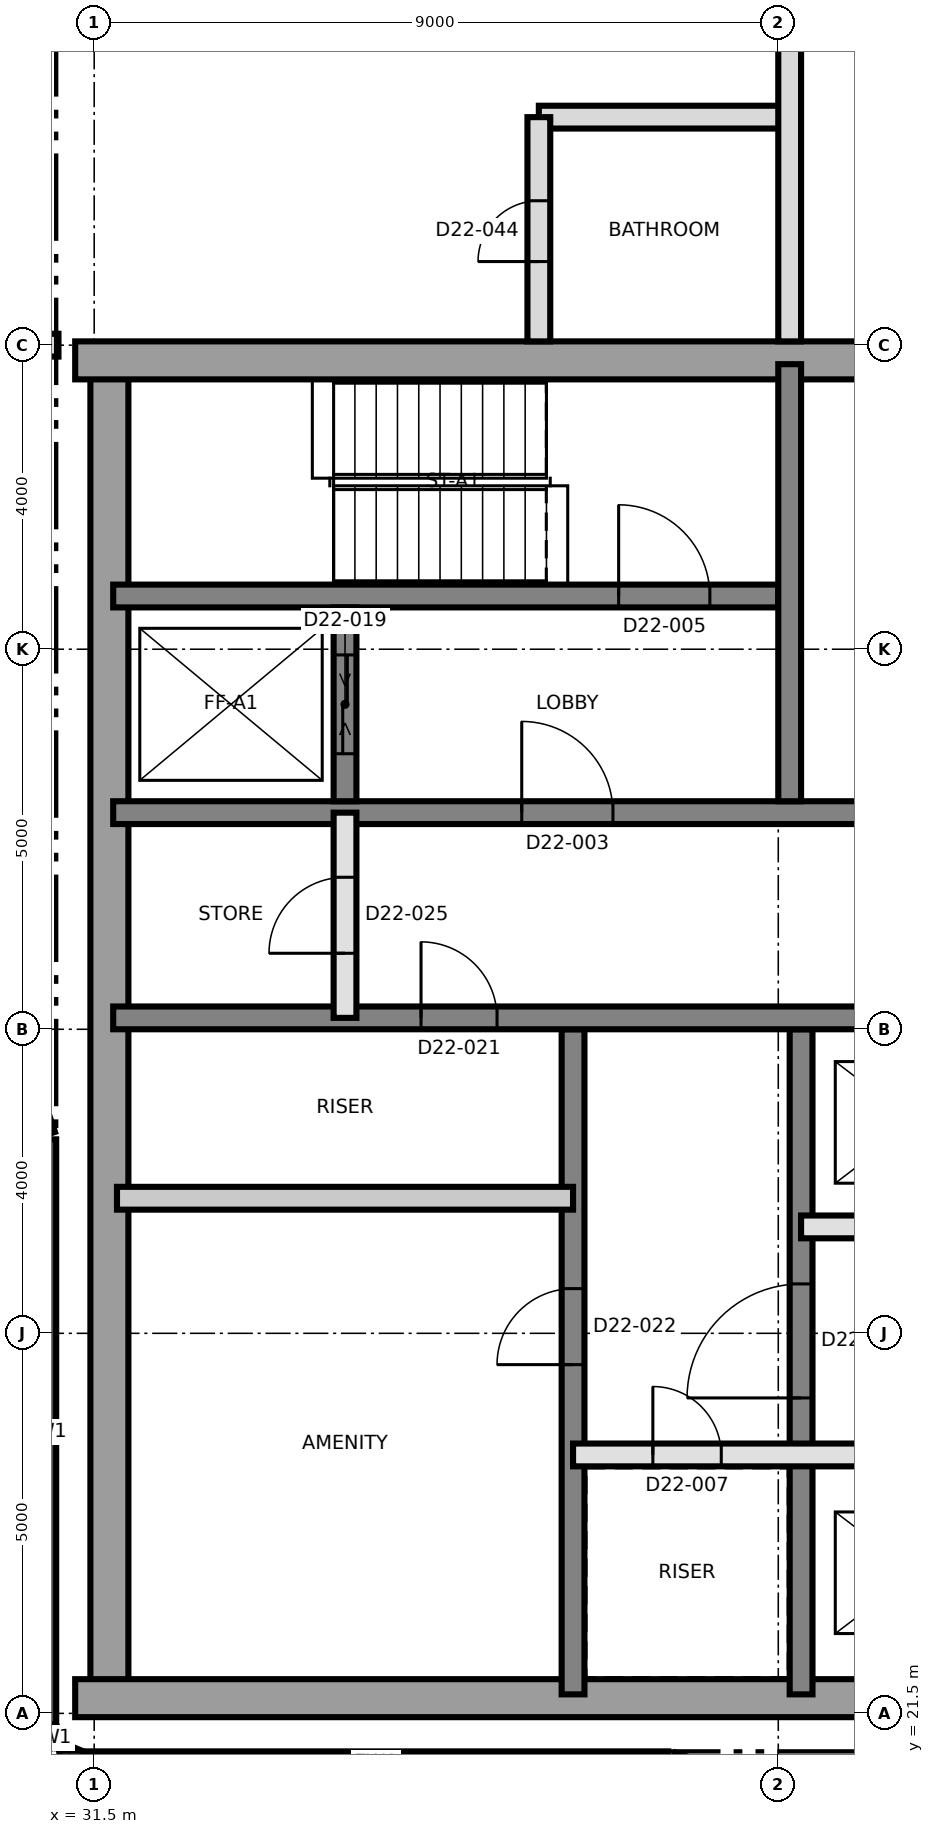
"""IFC4 building model, lengths in metres.
Left out: names, types, materials, properties, quantities, classifications, styles, units other than length and angle.
Written with IfcOpenShell. Run it as: python <this file> out.ifc"""

import sys

from ifc_helpers import new_model, si_unit, direction, frame, frame_2d, origin, place, context, subcontext, project, spatial, rectangle, extrude, element, fill, save


model = new_model("IFC4")
c1 = context("Model", 3, precision=1e-05, world=origin(), true_north=direction((0.0, 1.0)))
c2 = subcontext(c1, "Body", "Model", "MODEL_VIEW")
j1 = project(units=[si_unit("LENGTHUNIT", "METRE"), si_unit("PLANEANGLEUNIT", "RADIAN")], contexts=[c1])
p1 = place(None, origin())
s1 = spatial("IfcSite", under=j1, at=p1, CompositionType="ELEMENT")
p2 = place(p1, origin())
s2 = spatial("IfcBuilding", under=s1, at=p2, CompositionType="ELEMENT")
p3 = place(p2, frame((0.0, 0.0, 199.5)))
s3 = spatial("IfcBuildingStorey", under=s2, at=p3, CompositionType="ELEMENT", Elevation=199.5)
p4 = place(p3, frame((31.7, 21.75, 0.0), z_axis=(0.0, 0.0, 1.0), x_axis=(0.0, 1.0, 0.0)))
e1 = element("IfcWall", 1, at=p4, inside=s3, PredefinedType="SHEAR", context=c2, shape_type="SweptSolid", body=[
    extrude(rectangle(XDim=17.5, YDim=0.5, at=frame_2d((8.75, 0.0))), origin(), (0.0, 0.0, 1.0), 3.7),
])
p5 = place(p3, frame((31.25, 21.7, 0.0), z_axis=(0.0, 0.0, 1.0), x_axis=(1.0, 0.0, 0.0)))
e2 = element("IfcWall", 2, at=p5, inside=s3, PredefinedType="SHEAR", context=c2, shape_type="SweptSolid", body=[
    extrude(rectangle(XDim=27.0, YDim=0.5, at=frame_2d((13.5, 0.0))), origin(), (0.0, 0.0, 1.0), 3.7),
])
p6 = place(p3, frame((31.25, 39.3, 0.0), z_axis=(0.0, 0.0, 1.0), x_axis=(1.0, 0.0, 0.0)))
e3 = element("IfcWall", 3, at=p6, inside=s3, PredefinedType="SHEAR", context=c2, shape_type="SweptSolid", body=[
    extrude(rectangle(XDim=27.0, YDim=0.5, at=frame_2d((13.5, 0.0))), origin(), (0.0, 0.0, 1.0), 3.7),
])
p7 = place(p6, frame((10.45, 0.0, 0.0)))
e4 = element("IfcOpeningElement", 4, at=p7, cuts=e3, PredefinedType="OPENING", context=c2, shape_type="SweptSolid", body=[
    extrude(rectangle(XDim=1.2, YDim=2.1, at=frame_2d((0.6, 1.05))), frame((0.0, 0.26, 0.0), z_axis=(0.0, -1.0, 0.0), x_axis=(1.0, 0.0, 0.0)), (0.0, 0.0, 1.0), 0.52),
])
p8 = place(p3, frame((37.8, 21.75, 0.0), z_axis=(0.0, 0.0, 1.0), x_axis=(0.0, 1.0, 0.0)))
e5 = element("IfcWall", 5, at=p8, inside=s3, PredefinedType="SHEAR", context=c2, shape_type="SweptSolid", body=[
    extrude(rectangle(XDim=8.75, YDim=0.3, at=frame_2d((4.375, 0.0))), origin(), (0.0, 0.0, 1.0), 3.7),
])
p9 = place(p8, frame((4.338, 0.0, 0.0)))
e6 = element("IfcOpeningElement", 6, at=p9, cuts=e5, PredefinedType="OPENING", context=c2, shape_type="SweptSolid", body=[
    extrude(rectangle(XDim=1.0, YDim=2.1, at=frame_2d((0.5, 1.05))), frame((0.0, 0.16, 0.0), z_axis=(0.0, -1.0, 0.0), x_axis=(1.0, 0.0, 0.0)), (0.0, 0.0, 1.0), 0.32),
])
p10 = place(p3, frame((40.8, 21.75, 0.0), z_axis=(0.0, 0.0, 1.0), x_axis=(0.0, 1.0, 0.0)))
e7 = element("IfcWall", 7, at=p10, inside=s3, PredefinedType="SHEAR", context=c2, shape_type="SweptSolid", body=[
    extrude(rectangle(XDim=8.75, YDim=0.3, at=frame_2d((4.375, 0.0))), origin(), (0.0, 0.0, 1.0), 3.7),
])
p11 = place(p10, frame((3.9, 0.0, 0.0)))
e8 = element("IfcOpeningElement", 8, at=p11, cuts=e7, PredefinedType="OPENING", context=c2, shape_type="SweptSolid", body=[
    extrude(rectangle(XDim=1.5, YDim=2.1, at=frame_2d((0.75, 1.05))), frame((0.0, 0.16, 0.0), z_axis=(0.0, -1.0, 0.0), x_axis=(1.0, 0.0, 0.0)), (0.0, 0.0, 1.0), 0.32),
])
p12 = place(p3, frame((31.75, 30.65, 0.0), z_axis=(0.0, 0.0, 1.0), x_axis=(1.0, 0.0, 0.0)))
e9 = element("IfcWall", 9, at=p12, inside=s3, PredefinedType="SHEAR", context=c2, shape_type="SweptSolid", body=[
    extrude(rectangle(XDim=26.5, YDim=0.3, at=frame_2d((13.25, 0.0))), origin(), (0.0, 0.0, 1.0), 3.7),
])
p13 = place(p12, frame((24.75, 0.0, 0.0)))
e10 = element("IfcOpeningElement", 10, at=p13, cuts=e9, PredefinedType="OPENING", context=c2, shape_type="SweptSolid", body=[
    extrude(rectangle(XDim=1.0, YDim=2.1, at=frame_2d((0.5, 1.05))), frame((0.0, 0.16, 0.0), z_axis=(0.0, -1.0, 0.0), x_axis=(1.0, 0.0, 0.0)), (0.0, 0.0, 1.0), 0.32),
])
p14 = place(p12, frame((4.05, 0.0, 0.0)))
e11 = element("IfcOpeningElement", 11, at=p14, cuts=e9, PredefinedType="OPENING", context=c2, shape_type="SweptSolid", body=[
    extrude(rectangle(XDim=1.0, YDim=2.1, at=frame_2d((0.5, 1.05))), frame((0.0, 0.16, 0.0), z_axis=(0.0, -1.0, 0.0), x_axis=(1.0, 0.0, 0.0)), (0.0, 0.0, 1.0), 0.32),
])
p15 = place(p3, frame((31.75, 33.35, 0.0), z_axis=(0.0, 0.0, 1.0), x_axis=(1.0, 0.0, 0.0)))
e12 = element("IfcWall", 12, at=p15, inside=s3, PredefinedType="SHEAR", context=c2, shape_type="SweptSolid", body=[
    extrude(rectangle(XDim=26.5, YDim=0.3, at=frame_2d((13.25, 0.0))), origin(), (0.0, 0.0, 1.0), 3.7),
])
p16 = place(p15, frame((13.9, 0.0, 0.0)))
e13 = element("IfcOpeningElement", 13, at=p16, cuts=e12, PredefinedType="OPENING", context=c2, shape_type="SweptSolid", body=[
    extrude(rectangle(XDim=1.4, YDim=2.1, at=frame_2d((0.7, 1.05))), frame((0.0, 0.16, 0.0), z_axis=(0.0, -1.0, 0.0), x_axis=(1.0, 0.0, 0.0)), (0.0, 0.0, 1.0), 0.32),
])
p17 = place(p15, frame((5.375, 0.0, 0.0)))
e14 = element("IfcOpeningElement", 14, at=p17, cuts=e12, PredefinedType="OPENING", context=c2, shape_type="SweptSolid", body=[
    extrude(rectangle(XDim=1.2, YDim=2.1, at=frame_2d((0.6, 1.05))), frame((0.0, 0.16, 0.0), z_axis=(0.0, -1.0, 0.0), x_axis=(1.0, 0.0, 0.0)), (0.0, 0.0, 1.0), 0.32),
])
p18 = place(p15, frame((19.925, 0.0, 0.0)))
e15 = element("IfcOpeningElement", 15, at=p18, cuts=e12, PredefinedType="OPENING", context=c2, shape_type="SweptSolid", body=[
    extrude(rectangle(XDim=1.2, YDim=2.1, at=frame_2d((0.6, 1.05))), frame((0.0, 0.16, 0.0), z_axis=(0.0, -1.0, 0.0), x_axis=(1.0, 0.0, 0.0)), (0.0, 0.0, 1.0), 0.32),
])
p19 = place(p3, frame((31.75, 36.2, 0.0), z_axis=(0.0, 0.0, 1.0), x_axis=(1.0, 0.0, 0.0)))
e16 = element("IfcWall", 16, at=p19, inside=s3, PredefinedType="SHEAR", context=c2, shape_type="SweptSolid", body=[
    extrude(rectangle(XDim=8.75, YDim=0.3, at=frame_2d((4.375, 0.0))), origin(), (0.0, 0.0, 1.0), 3.7),
])
p20 = place(p19, frame((6.65, 0.0, 0.0)))
e17 = element("IfcOpeningElement", 17, at=p20, cuts=e16, PredefinedType="OPENING", context=c2, shape_type="SweptSolid", body=[
    extrude(rectangle(XDim=1.2, YDim=2.1, at=frame_2d((0.6, 1.05))), frame((0.0, 0.16, 0.0), z_axis=(0.0, -1.0, 0.0), x_axis=(1.0, 0.0, 0.0)), (0.0, 0.0, 1.0), 0.32),
])
p21 = place(p3, frame((40.65, 33.5, 0.0), z_axis=(0.0, 0.0, 1.0), x_axis=(0.0, 1.0, 0.0)))
e18 = element("IfcWall", 18, at=p21, inside=s3, PredefinedType="SHEAR", context=c2, shape_type="SweptSolid", body=[
    extrude(rectangle(XDim=5.75, YDim=0.3, at=frame_2d((2.875, 0.0))), origin(), (0.0, 0.0, 1.0), 3.7),
])
p22 = place(p3, frame((34.8, 33.5, 0.0), z_axis=(0.0, 0.0, 1.0), x_axis=(0.0, 1.0, 0.0)))
e19 = element("IfcWall", 19, at=p22, inside=s3, PredefinedType="SHEAR", context=c2, shape_type="SweptSolid", body=[
    extrude(rectangle(XDim=2.55, YDim=0.3, at=frame_2d((1.275, 0.0))), origin(), (0.0, 0.0, 1.0), 3.7),
])
p23 = place(p22, frame((0.625, 0.0, 0.0)))
e20 = element("IfcOpeningElement", 20, at=p23, cuts=e19, PredefinedType="OPENING", context=c2, shape_type="SweptSolid", body=[
    extrude(rectangle(XDim=1.3, YDim=2.4, at=frame_2d((0.65, 1.2))), frame((0.0, 0.16, 0.0), z_axis=(0.0, -1.0, 0.0), x_axis=(1.0, 0.0, 0.0)), (0.0, 0.0, 1.0), 0.32),
])
p24 = place(p3, frame((30.85, 29.052, 0.0), z_axis=(0.0, 0.0, 1.0), x_axis=(0.0, -1.0, 0.0)))
e21 = element("IfcWall", 21, at=p24, inside=s3, PredefinedType="SOLIDWALL", context=c2, shape_type="SweptSolid", body=[
    extrude(rectangle(XDim=7.693, YDim=0.3, at=frame_2d((3.846, 0.0))), origin(), (0.0, 0.0, 1.0), 3.4),
])
for number, where, z_axis, x_axis in (
    (22, (30.861, 21.302, 0.0), (0.0, 0.0, 1.0), (0.383, -0.924, 0.0)),
    (23, (31.048, 20.967, 0.0), (0.0, 0.0, 1.0), (0.924, -0.383, 0.0)),
):
    element("IfcWall", number, at=place(p3, frame(where, z_axis=z_axis, x_axis=x_axis)), inside=s3, PredefinedType="SOLIDWALL", context=c2, shape_type="SweptSolid", body=[
        extrude(rectangle(XDim=0.275, YDim=0.3, at=frame_2d((0.138, 0.0))), origin(), (0.0, 0.0, 1.0), 3.4),
    ])
p25 = place(p3, frame((31.36, 20.85, 0.0), z_axis=(0.0, 0.0, 1.0), x_axis=(1.0, 0.0, 0.0)))
e24 = element("IfcWall", 24, at=p25, inside=s3, PredefinedType="SOLIDWALL", context=c2, shape_type="SweptSolid", body=[
    extrude(rectangle(XDim=7.693, YDim=0.3, at=frame_2d((3.846, 0.0))), origin(), (0.0, 0.0, 1.0), 3.4),
])
for number, where, z_axis, x_axis in (
    (25, (39.101, 20.842, 0.0), (0.0, 0.0, 1.0), (0.947, -0.321, 0.0)),
    (26, (30.418, 30.351, 0.0), (0.0, 0.0, 1.0), (0.321, -0.947, 0.0)),
):
    element("IfcWall", number, at=place(p3, frame(where, z_axis=z_axis, x_axis=x_axis)), inside=s3, PredefinedType="SOLIDWALL", context=c2, shape_type="SweptSolid", body=[
        extrude(rectangle(XDim=1.32, YDim=0.3, at=frame_2d((0.66, 0.0))), origin(), (0.0, 0.0, 1.0), 3.4),
    ])
p26 = place(p3, frame((37.8, 24.9, 0.0), z_axis=(0.0, 0.0, 1.0), x_axis=(1.0, 0.0, 0.0)))
e27 = element("IfcWall", 27, at=p26, inside=s3, PredefinedType="SOLIDWALL", context=c2, shape_type="SweptSolid", body=[
    extrude(rectangle(XDim=12.0, YDim=0.3, at=frame_2d((6.0, 0.0))), origin(), (0.0, 0.0, 1.0), 3.4),
])
p27 = place(p26, frame((1.05, 0.0, 0.0)))
e28 = element("IfcOpeningElement", 28, at=p27, cuts=e27, PredefinedType="OPENING", context=c2, shape_type="SweptSolid", body=[
    extrude(rectangle(XDim=0.9, YDim=2.1, at=frame_2d((0.45, 1.05))), frame((0.0, 0.16, 0.0), z_axis=(0.0, -1.0, 0.0), x_axis=(1.0, 0.0, 0.0)), (0.0, 0.0, 1.0), 0.32),
])
p28 = place(p26, frame((10.05, 0.0, 0.0)))
e29 = element("IfcOpeningElement", 29, at=p28, cuts=e27, PredefinedType="OPENING", context=c2, shape_type="SweptSolid", body=[
    extrude(rectangle(XDim=0.9, YDim=2.1, at=frame_2d((0.45, 1.05))), frame((0.0, 0.16, 0.0), z_axis=(0.0, -1.0, 0.0), x_axis=(1.0, 0.0, 0.0)), (0.0, 0.0, 1.0), 0.32),
])
p29 = place(p26, frame((3.95, 0.0, 0.0)))
e30 = element("IfcOpeningElement", 30, at=p29, cuts=e27, PredefinedType="OPENING", context=c2, shape_type="SweptSolid", body=[
    extrude(rectangle(XDim=1.1, YDim=2.4, at=frame_2d((0.55, 1.2))), frame((0.0, 0.16, 0.0), z_axis=(0.0, -1.0, 0.0), x_axis=(1.0, 0.0, 0.0)), (0.0, 0.0, 1.0), 0.32),
])
p30 = place(p26, frame((6.95, 0.0, 0.0)))
e31 = element("IfcOpeningElement", 31, at=p30, cuts=e27, PredefinedType="OPENING", context=c2, shape_type="SweptSolid", body=[
    extrude(rectangle(XDim=1.1, YDim=2.4, at=frame_2d((0.55, 1.2))), frame((0.0, 0.16, 0.0), z_axis=(0.0, -1.0, 0.0), x_axis=(1.0, 0.0, 0.0)), (0.0, 0.0, 1.0), 0.32),
])
p31 = place(p3, frame((40.8, 27.9, 0.0), z_axis=(0.0, 0.0, 1.0), x_axis=(1.0, 0.0, 0.0)))
e32 = element("IfcWall", 32, at=p31, inside=s3, PredefinedType="SOLIDWALL", context=c2, shape_type="SweptSolid", body=[
    extrude(rectangle(XDim=6.0, YDim=0.3, at=frame_2d((3.0, 0.0))), origin(), (0.0, 0.0, 1.0), 3.4),
])
p32 = place(p31, frame((0.95, 0.0, 0.0)))
e33 = element("IfcOpeningElement", 33, at=p32, cuts=e32, PredefinedType="OPENING", context=c2, shape_type="SweptSolid", body=[
    extrude(rectangle(XDim=1.1, YDim=2.4, at=frame_2d((0.55, 1.2))), frame((0.0, 0.16, 0.0), z_axis=(0.0, -1.0, 0.0), x_axis=(1.0, 0.0, 0.0)), (0.0, 0.0, 1.0), 0.32),
])
p33 = place(p31, frame((3.95, 0.0, 0.0)))
e34 = element("IfcOpeningElement", 34, at=p33, cuts=e32, PredefinedType="OPENING", context=c2, shape_type="SweptSolid", body=[
    extrude(rectangle(XDim=1.1, YDim=2.4, at=frame_2d((0.55, 1.2))), frame((0.0, 0.16, 0.0), z_axis=(0.0, -1.0, 0.0), x_axis=(1.0, 0.0, 0.0)), (0.0, 0.0, 1.0), 0.32),
])
p34 = place(p3, frame((31.8, 28.277, 0.0), z_axis=(0.0, 0.0, 1.0), x_axis=(1.0, 0.0, 0.0)))
e35 = element("IfcWall", 35, at=p34, inside=s3, PredefinedType="PARTITIONING", context=c2, shape_type="SweptSolid", body=[
    extrude(rectangle(XDim=6.0, YDim=0.3, at=frame_2d((3.0, 0.0))), origin(), (0.0, 0.0, 1.0), 3.4),
])
p35 = place(p3, frame((34.8, 30.65, 0.0), z_axis=(0.0, 0.0, 1.0), x_axis=(0.0, 1.0, 0.0)))
e36 = element("IfcWall", 36, at=p35, inside=s3, PredefinedType="SOLIDWALL", context=c2, shape_type="SweptSolid", body=[
    extrude(rectangle(XDim=2.7, YDim=0.3, at=frame_2d((1.35, 0.0))), origin(), (0.0, 0.0, 1.0), 3.4),
])
p36 = place(p35, frame((0.85, 0.0, 0.0)))
e37 = element("IfcOpeningElement", 37, at=p36, cuts=e36, PredefinedType="OPENING", context=c2, shape_type="SweptSolid", body=[
    extrude(rectangle(XDim=1.0, YDim=2.1, at=frame_2d((0.5, 1.05))), frame((0.0, 0.16, 0.0), z_axis=(0.0, -1.0, 0.0), x_axis=(1.0, 0.0, 0.0)), (0.0, 0.0, 1.0), 0.32),
])
p37 = place(p3, frame((30.135, 39.5, 0.0), z_axis=(0.0, 0.0, 1.0), x_axis=(1.0, 0.0, 0.0)))
e38 = element("IfcWall", 38, at=p37, inside=s3, PredefinedType="PARTITIONING", context=c2, shape_type="SweptSolid", body=[
    extrude(rectangle(XDim=0.895, YDim=0.3, at=frame_2d((0.448, 0.0))), origin(), (0.0, 0.0, 1.0), 3.4),
])
p38 = place(p3, frame((37.35, 42.5, 0.0), z_axis=(0.0, 0.0, 1.0), x_axis=(1.0, 0.0, 0.0)))
e39 = element("IfcWall", 39, at=p38, inside=s3, PredefinedType="PARTITIONING", context=c2, shape_type="SweptSolid", body=[
    extrude(rectangle(XDim=3.3, YDim=0.3, at=frame_2d((1.65, 0.0))), origin(), (0.0, 0.0, 1.0), 3.4),
])
p39 = place(p3, frame((37.35, 39.55, 0.0), z_axis=(0.0, 0.0, 1.0), x_axis=(0.0, 1.0, 0.0)))
e40 = element("IfcWall", 40, at=p39, inside=s3, PredefinedType="PARTITIONING", context=c2, shape_type="SweptSolid", body=[
    extrude(rectangle(XDim=2.95, YDim=0.3, at=frame_2d((1.475, 0.0))), origin(), (0.0, 0.0, 1.0), 3.4),
])
p40 = place(p39, frame((1.05, 0.0, 0.0)))
e41 = element("IfcOpeningElement", 41, at=p40, cuts=e40, PredefinedType="OPENING", context=c2, shape_type="SweptSolid", body=[
    extrude(rectangle(XDim=0.8, YDim=2.1, at=frame_2d((0.4, 1.05))), frame((0.0, 0.16, 0.0), z_axis=(0.0, -1.0, 0.0), x_axis=(1.0, 0.0, 0.0)), (0.0, 0.0, 1.0), 0.32),
])
p41 = place(p3, frame((40.65, 39.55, 0.0), z_axis=(0.0, 0.0, 1.0), x_axis=(0.0, 1.0, 0.0)))
e42 = element("IfcWall", 42, at=p41, inside=s3, PredefinedType="PARTITIONING", context=c2, shape_type="SweptSolid", body=[
    extrude(rectangle(XDim=19.0, YDim=0.3, at=frame_2d((9.5, 0.0))), origin(), (0.0, 0.0, 1.0), 3.4),
])
p42 = place(p41, frame((3.95, 0.0, 0.0)))
e43 = element("IfcOpeningElement", 43, at=p42, cuts=e42, PredefinedType="OPENING", context=c2, shape_type="SweptSolid", body=[
    extrude(rectangle(XDim=1.0, YDim=2.4, at=frame_2d((0.5, 1.2))), frame((0.0, 0.16, 0.0), z_axis=(0.0, -1.0, 0.0), x_axis=(1.0, 0.0, 0.0)), (0.0, 0.0, 1.0), 0.32),
])
p43 = place(p41, frame((12.05, 0.0, 0.0)))
e44 = element("IfcOpeningElement", 44, at=p43, cuts=e42, PredefinedType="OPENING", context=c2, shape_type="SweptSolid", body=[
    extrude(rectangle(XDim=1.0, YDim=2.1, at=frame_2d((0.5, 1.05))), frame((0.0, 0.16, 0.0), z_axis=(0.0, -1.0, 0.0), x_axis=(1.0, 0.0, 0.0)), (0.0, 0.0, 1.0), 0.32),
])
p44 = place(p41, frame((13.85, 0.0, 0.0)))
e45 = element("IfcOpeningElement", 45, at=p44, cuts=e42, PredefinedType="OPENING", context=c2, shape_type="SweptSolid", body=[
    extrude(rectangle(XDim=1.0, YDim=2.1, at=frame_2d((0.5, 1.05))), frame((0.0, 0.16, 0.0), z_axis=(0.0, -1.0, 0.0), x_axis=(1.0, 0.0, 0.0)), (0.0, 0.0, 1.0), 0.32),
])
p45 = place(p11, origin())
e46 = element("IfcDoor", 46, at=p45, inside=s3, OperationType="SINGLE_SWING_RIGHT", PredefinedType="DOOR", context=c2, shape_type="SweptSolid", body=[
    extrude(rectangle(XDim=1.5, YDim=2.1, at=frame_2d((0.75, 1.05))), frame((0.0, 0.025, 0.0), z_axis=(0.0, -1.0, 0.0), x_axis=(1.0, 0.0, 0.0)), (0.0, 0.0, 1.0), 0.05),
])
fill(e8, e46)
p46 = place(p17, origin())
e47 = element("IfcDoor", 47, at=p46, inside=s3, OperationType="SINGLE_SWING_LEFT", PredefinedType="DOOR", context=c2, shape_type="SweptSolid", body=[
    extrude(rectangle(XDim=1.2, YDim=2.1, at=frame_2d((0.6, 1.05))), frame((0.0, 0.025, 0.0), z_axis=(0.0, -1.0, 0.0), x_axis=(1.0, 0.0, 0.0)), (0.0, 0.0, 1.0), 0.05),
])
fill(e14, e47)
p47 = place(p20, origin())
e48 = element("IfcDoor", 48, at=p47, inside=s3, OperationType="SINGLE_SWING_RIGHT", PredefinedType="DOOR", context=c2, shape_type="SweptSolid", body=[
    extrude(rectangle(XDim=1.2, YDim=2.1, at=frame_2d((0.6, 1.05))), frame((0.0, 0.025, 0.0), z_axis=(0.0, -1.0, 0.0), x_axis=(1.0, 0.0, 0.0)), (0.0, 0.0, 1.0), 0.05),
])
fill(e17, e48)
p48 = place(p27, origin())
e49 = element("IfcDoor", 49, at=p48, inside=s3, OperationType="SINGLE_SWING_LEFT", PredefinedType="DOOR", context=c2, shape_type="SweptSolid", body=[
    extrude(rectangle(XDim=0.9, YDim=2.1, at=frame_2d((0.45, 1.05))), frame((0.0, 0.025, 0.0), z_axis=(0.0, -1.0, 0.0), x_axis=(1.0, 0.0, 0.0)), (0.0, 0.0, 1.0), 0.05),
])
fill(e28, e49)
p49 = place(p23, origin())
e50 = element("IfcDoor", 50, at=p49, inside=s3, OperationType="SLIDING_TO_LEFT", PredefinedType="DOOR", context=c2, shape_type="SweptSolid", body=[
    extrude(rectangle(XDim=1.3, YDim=2.4, at=frame_2d((0.65, 1.2))), frame((0.0, 0.025, 0.0), z_axis=(0.0, -1.0, 0.0), x_axis=(1.0, 0.0, 0.0)), (0.0, 0.0, 1.0), 0.05),
])
fill(e20, e50)
p50 = place(p14, origin())
e51 = element("IfcDoor", 51, at=p50, inside=s3, OperationType="SINGLE_SWING_LEFT", PredefinedType="DOOR", context=c2, shape_type="SweptSolid", body=[
    extrude(rectangle(XDim=1.0, YDim=2.1, at=frame_2d((0.5, 1.05))), frame((0.0, 0.025, 0.0), z_axis=(0.0, -1.0, 0.0), x_axis=(1.0, 0.0, 0.0)), (0.0, 0.0, 1.0), 0.05),
])
fill(e11, e51)
p51 = place(p9, origin())
e52 = element("IfcDoor", 52, at=p51, inside=s3, OperationType="SINGLE_SWING_RIGHT", PredefinedType="DOOR", context=c2, shape_type="SweptSolid", body=[
    extrude(rectangle(XDim=1.0, YDim=2.1, at=frame_2d((0.5, 1.05))), frame((0.0, 0.025, 0.0), z_axis=(0.0, -1.0, 0.0), x_axis=(1.0, 0.0, 0.0)), (0.0, 0.0, 1.0), 0.05),
])
fill(e6, e52)
p52 = place(p36, origin())
e53 = element("IfcDoor", 53, at=p52, inside=s3, OperationType="SINGLE_SWING_LEFT", PredefinedType="DOOR", context=c2, shape_type="SweptSolid", body=[
    extrude(rectangle(XDim=1.0, YDim=2.1, at=frame_2d((0.5, 1.05))), frame((0.0, 0.025, 0.0), z_axis=(0.0, -1.0, 0.0), x_axis=(1.0, 0.0, 0.0)), (0.0, 0.0, 1.0), 0.05),
])
fill(e37, e53)
p53 = place(p40, origin())
e54 = element("IfcDoor", 54, at=p53, inside=s3, OperationType="SINGLE_SWING_LEFT", PredefinedType="DOOR", context=c2, shape_type="SweptSolid", body=[
    extrude(rectangle(XDim=0.8, YDim=2.1, at=frame_2d((0.4, 1.05))), frame((0.0, 0.025, 0.0), z_axis=(0.0, -1.0, 0.0), x_axis=(1.0, 0.0, 0.0)), (0.0, 0.0, 1.0), 0.05),
])
fill(e41, e54)
save(model, sys.argv[1])
